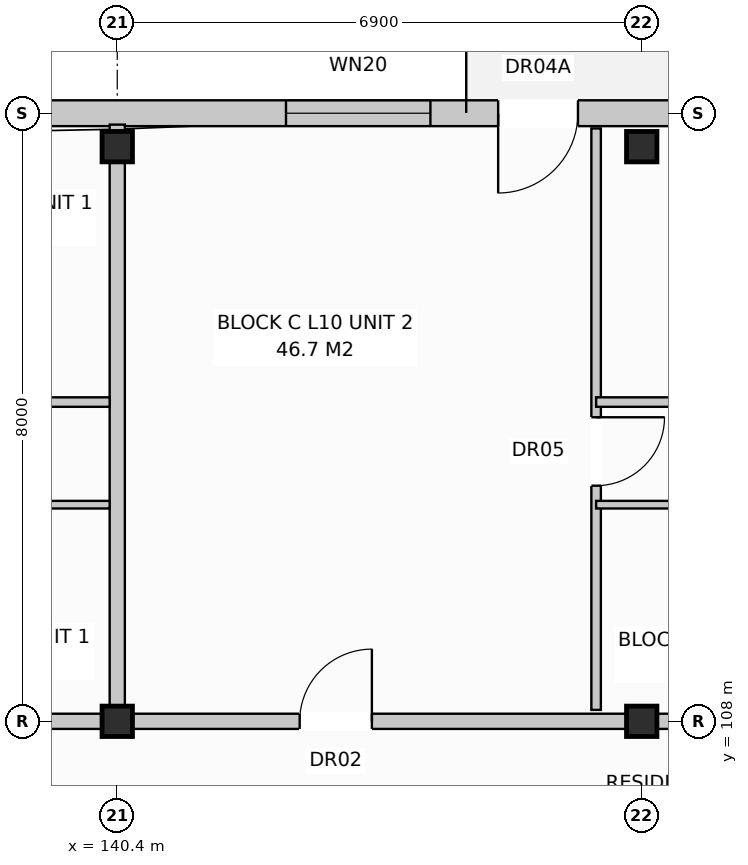
"""IFC4 building model, lengths in metres.
Left out: names, types, materials, properties, quantities, classifications, styles, units other than length and angle.
Written with IfcOpenShell. Run it as: python <this file> out.ifc"""

import sys

from ifc_helpers import new_model, si_unit, direction, frame, frame_2d, origin, origin_with_axes, origin_2d, place, context, subcontext, project, spatial, rectangle, extrude, element, fill, save


model = new_model("IFC4")
c1 = context("Model", 3, precision=1e-05, world=origin(), true_north=direction((0.0, 1.0)))
c2 = subcontext(c1, "Body", "Model", "MODEL_VIEW")
j1 = project(units=[si_unit("LENGTHUNIT", "METRE"), si_unit("PLANEANGLEUNIT", "RADIAN")], contexts=[c1])
p1 = place(None, origin())
s1 = spatial("IfcSite", under=j1, at=p1, CompositionType="ELEMENT")
p2 = place(p1, origin())
s2 = spatial("IfcBuilding", under=s1, at=p2, CompositionType="ELEMENT")
p3 = place(p2, frame((0.0, 0.0, 33.6)))
s3 = spatial("IfcBuildingStorey", under=s2, at=p3, CompositionType="ELEMENT", Elevation=33.6)
for number, where, z_axis, x_axis in (
    (1, (140.4, 108.0, 0.0), (0.0, 0.0, 1.0), (1.0, 0.0, 0.0)),
    (2, (140.4, 115.56, 0.0), (0.0, 0.0, 1.0), (1.0, 0.0, 0.0)),
    (3, (147.3, 108.0, 0.0), (0.0, 0.0, 1.0), (1.0, 0.0, 0.0)),
    (4, (147.3, 115.56, 0.0), (0.0, 0.0, 1.0), (1.0, 0.0, 0.0)),
):
    element("IfcColumn", number, at=place(p3, frame(where, z_axis=z_axis, x_axis=x_axis)), inside=s3, PredefinedType="COLUMN", context=c2, shape_type="SweptSolid", body=[
        extrude(rectangle(XDim=0.4, YDim=0.4, at=origin_2d()), origin(), (0.0, 0.0, 1.0), 3.2),
    ])
p4 = place(p3, frame((126.76, 116.0, 0.0), z_axis=(0.0, 0.0, 1.0), x_axis=(1.0, 0.0, 0.0)))
e5 = element("IfcWall", 5, at=p4, inside=s3, PredefinedType="STANDARD", context=c2, shape_type="SweptSolid", body=[
    extrude(rectangle(XDim=41.08, YDim=0.34, at=frame_2d((20.54, 0.0))), origin(), (0.0, 0.0, 1.0), 2.91),
])
p5 = place(p4, frame((7.36, 0.0, 0.0)))
e6 = element("IfcOpeningElement", 6, at=p5, cuts=e5, PredefinedType="OPENING", context=c2, shape_type="SweptSolid", body=[
    extrude(rectangle(XDim=1.05, YDim=2.12, at=frame_2d((0.525, 1.06))), frame((0.0, 0.182, 0.0), z_axis=(0.0, -1.0, 0.0), x_axis=(1.0, 0.0, 0.0)), (0.0, 0.0, 1.0), 0.364),
])
p6 = place(p4, frame((18.651, 0.0, 0.0)))
e7 = element("IfcOpeningElement", 7, at=p6, cuts=e5, PredefinedType="OPENING", context=c2, shape_type="SweptSolid", body=[
    extrude(rectangle(XDim=1.05, YDim=2.12, at=frame_2d((0.525, 1.06))), frame((0.0, 0.182, 0.0), z_axis=(0.0, -1.0, 0.0), x_axis=(1.0, 0.0, 0.0)), (0.0, 0.0, 1.0), 0.364),
])
p7 = place(p4, frame((32.651, 0.0, 0.0)))
e8 = element("IfcOpeningElement", 8, at=p7, cuts=e5, PredefinedType="OPENING", context=c2, shape_type="SweptSolid", body=[
    extrude(rectangle(XDim=1.05, YDim=2.12, at=frame_2d((0.525, 1.06))), frame((0.0, 0.182, 0.0), z_axis=(0.0, -1.0, 0.0), x_axis=(1.0, 0.0, 0.0)), (0.0, 0.0, 1.0), 0.364),
])
p8 = place(p4, frame((1.535, 0.0, 0.8)))
e9 = element("IfcOpeningElement", 9, at=p8, cuts=e5, PredefinedType="OPENING", context=c2, shape_type="SweptSolid", body=[
    extrude(rectangle(XDim=1.95, YDim=1.65, at=frame_2d((0.975, 0.825))), frame((0.0, 0.182, 0.0), z_axis=(0.0, -1.0, 0.0), x_axis=(1.0, 0.0, 0.0)), (0.0, 0.0, 1.0), 0.364),
])
p9 = place(p4, frame((10.51, 0.0, 0.8)))
e10 = element("IfcOpeningElement", 10, at=p9, cuts=e5, PredefinedType="OPENING", context=c2, shape_type="SweptSolid", body=[
    extrude(rectangle(XDim=1.8, YDim=1.7, at=frame_2d((0.9, 0.85))), frame((0.0, 0.182, 0.0), z_axis=(0.0, -1.0, 0.0), x_axis=(1.0, 0.0, 0.0)), (0.0, 0.0, 1.0), 0.364),
])
p10 = place(p4, frame((15.86, 0.0, 0.8)))
e11 = element("IfcOpeningElement", 11, at=p10, cuts=e5, PredefinedType="OPENING", context=c2, shape_type="SweptSolid", body=[
    extrude(rectangle(XDim=1.9, YDim=1.85, at=frame_2d((0.95, 0.925))), frame((0.0, 0.182, 0.0), z_axis=(0.0, -1.0, 0.0), x_axis=(1.0, 0.0, 0.0)), (0.0, 0.0, 1.0), 0.364),
])
p11 = place(p4, frame((21.96, 0.0, 0.72)))
e12 = element("IfcOpeningElement", 12, at=p11, cuts=e5, PredefinedType="OPENING", context=c2, shape_type="SweptSolid", body=[
    extrude(rectangle(XDim=1.1, YDim=1.5, at=frame_2d((0.55, 0.75))), frame((0.0, 0.182, 0.0), z_axis=(0.0, -1.0, 0.0), x_axis=(1.0, 0.0, 0.0)), (0.0, 0.0, 1.0), 0.364),
])
p12 = place(p4, frame((28.01, 0.0, 0.8)))
e13 = element("IfcOpeningElement", 13, at=p12, cuts=e5, PredefinedType="OPENING", context=c2, shape_type="SweptSolid", body=[
    extrude(rectangle(XDim=1.8, YDim=1.7, at=frame_2d((0.9, 0.85))), frame((0.0, 0.182, 0.0), z_axis=(0.0, -1.0, 0.0), x_axis=(1.0, 0.0, 0.0)), (0.0, 0.0, 1.0), 0.364),
])
p13 = place(p4, frame((30.81, 0.0, 0.85)))
e14 = element("IfcOpeningElement", 14, at=p13, cuts=e5, PredefinedType="OPENING", context=c2, shape_type="SweptSolid", body=[
    extrude(rectangle(XDim=1.5, YDim=1.65, at=frame_2d((0.75, 0.825))), frame((0.0, 0.182, 0.0), z_axis=(0.0, -1.0, 0.0), x_axis=(1.0, 0.0, 0.0)), (0.0, 0.0, 1.0), 0.364),
])
p14 = place(p4, frame((35.76, 0.0, 0.72)))
e15 = element("IfcOpeningElement", 15, at=p14, cuts=e5, PredefinedType="OPENING", context=c2, shape_type="SweptSolid", body=[
    extrude(rectangle(XDim=1.1, YDim=1.5, at=frame_2d((0.55, 0.75))), frame((0.0, 0.182, 0.0), z_axis=(0.0, -1.0, 0.0), x_axis=(1.0, 0.0, 0.0)), (0.0, 0.0, 1.0), 0.364),
])
p15 = place(p4, frame((38.675, 0.0, 0.8)))
e16 = element("IfcOpeningElement", 16, at=p15, cuts=e5, PredefinedType="OPENING", context=c2, shape_type="SweptSolid", body=[
    extrude(rectangle(XDim=1.8, YDim=1.7, at=frame_2d((0.9, 0.85))), frame((0.0, 0.182, 0.0), z_axis=(0.0, -1.0, 0.0), x_axis=(1.0, 0.0, 0.0)), (0.0, 0.0, 1.0), 0.364),
])
p16 = place(p3, frame((140.4, 108.15, 0.0), z_axis=(0.0, 0.0, 1.0), x_axis=(0.0, 1.0, 0.0)))
e17 = element("IfcWall", 17, at=p16, inside=s3, PredefinedType="PARTITIONING", context=c2, shape_type="SweptSolid", body=[
    extrude(rectangle(XDim=7.7, YDim=0.2, at=frame_2d((3.85, 0.0))), origin(), (0.0, 0.0, 1.0), 2.96),
])
p17 = place(p3, frame((126.6, 108.0, 0.0), z_axis=(0.0, 0.0, 1.0), x_axis=(1.0, 0.0, 0.0)))
e18 = element("IfcWall", 18, at=p17, inside=s3, PredefinedType="PARTITIONING", context=c2, shape_type="SweptSolid", body=[
    extrude(rectangle(XDim=13.8, YDim=0.2, at=frame_2d((6.9, 0.0))), origin(), (0.0, 0.0, 1.0), 2.35),
])
p18 = place(p17, frame((2.4, 0.0, 0.0)))
e19 = element("IfcOpeningElement", 19, at=p18, cuts=e18, PredefinedType="OPENING", context=c2, shape_type="SweptSolid", body=[
    extrude(rectangle(XDim=0.95, YDim=2.15, at=frame_2d((0.475, 1.075))), frame((0.0, 0.112, 0.0), z_axis=(0.0, -1.0, 0.0), x_axis=(1.0, 0.0, 0.0)), (0.0, 0.0, 1.0), 0.224),
])
p19 = place(p3, frame((131.8, 110.85, 0.0), z_axis=(0.0, 0.0, 1.0), x_axis=(1.0, 0.0, 0.0)))
e20 = element("IfcWall", 20, at=p19, inside=s3, PredefinedType="PARTITIONING", context=c2, shape_type="SweptSolid", body=[
    extrude(rectangle(XDim=8.5, YDim=0.1, at=frame_2d((4.25, 0.0))), origin(), (0.0, 0.0, 1.0), 2.96),
])
p20 = place(p19, frame((1.0, 0.0, 0.0)))
e21 = element("IfcOpeningElement", 21, at=p20, cuts=e20, PredefinedType="OPENING", context=c2, shape_type="SweptSolid", body=[
    extrude(rectangle(XDim=0.85, YDim=2.1, at=frame_2d((0.425, 1.05))), frame((0.0, 0.062, 0.0), z_axis=(0.0, -1.0, 0.0), x_axis=(1.0, 0.0, 0.0)), (0.0, 0.0, 1.0), 0.124),
])
p21 = place(p19, frame((3.4, 0.0, 0.0)))
e22 = element("IfcOpeningElement", 22, at=p21, cuts=e20, PredefinedType="OPENING", context=c2, shape_type="SweptSolid", body=[
    extrude(rectangle(XDim=0.85, YDim=2.05, at=frame_2d((0.425, 1.025))), frame((0.0, 0.062, 0.0), z_axis=(0.0, -1.0, 0.0), x_axis=(1.0, 0.0, 0.0)), (0.0, 0.0, 1.0), 0.124),
])
p22 = place(p19, frame((6.2, 0.0, 0.0)))
e23 = element("IfcOpeningElement", 23, at=p22, cuts=e20, PredefinedType="OPENING", context=c2, shape_type="SweptSolid", body=[
    extrude(rectangle(XDim=0.85, YDim=2.05, at=frame_2d((0.425, 1.025))), frame((0.0, 0.062, 0.0), z_axis=(0.0, -1.0, 0.0), x_axis=(1.0, 0.0, 0.0)), (0.0, 0.0, 1.0), 0.124),
])
p23 = place(p3, frame((131.8, 112.2, 0.0), z_axis=(0.0, 0.0, 1.0), x_axis=(1.0, 0.0, 0.0)))
e24 = element("IfcWall", 24, at=p23, inside=s3, PredefinedType="PARTITIONING", context=c2, shape_type="SweptSolid", body=[
    extrude(rectangle(XDim=8.5, YDim=0.125, at=frame_2d((4.25, 0.0))), origin(), (0.0, 0.0, 1.0), 2.96),
])
p24 = place(p23, frame((1.5, 0.0, 0.0)))
e25 = element("IfcOpeningElement", 25, at=p24, cuts=e24, PredefinedType="OPENING", context=c2, shape_type="SweptSolid", body=[
    extrude(rectangle(XDim=0.9, YDim=2.1, at=frame_2d((0.45, 1.05))), frame((0.0, 0.074, 0.0), z_axis=(0.0, -1.0, 0.0), x_axis=(1.0, 0.0, 0.0)), (0.0, 0.0, 1.0), 0.149),
])
p25 = place(p23, frame((5.6, 0.0, 0.0)))
e26 = element("IfcOpeningElement", 26, at=p25, cuts=e24, PredefinedType="OPENING", context=c2, shape_type="SweptSolid", body=[
    extrude(rectangle(XDim=0.9, YDim=2.1, at=frame_2d((0.45, 1.05))), frame((0.0, 0.074, 0.0), z_axis=(0.0, -1.0, 0.0), x_axis=(1.0, 0.0, 0.0)), (0.0, 0.0, 1.0), 0.149),
])
p26 = place(p3, frame((140.4, 108.0, 0.0), z_axis=(0.0, 0.0, 1.0), x_axis=(1.0, 0.0, 0.0)))
e27 = element("IfcWall", 27, at=p26, inside=s3, PredefinedType="PARTITIONING", context=c2, shape_type="SweptSolid", body=[
    extrude(rectangle(XDim=20.7, YDim=0.2, at=frame_2d((10.35, 0.0))), origin(), (0.0, 0.0, 1.0), 2.35),
])
p27 = place(p26, frame((2.4, 0.0, 0.0)))
e28 = element("IfcOpeningElement", 28, at=p27, cuts=e27, PredefinedType="OPENING", context=c2, shape_type="SweptSolid", body=[
    extrude(rectangle(XDim=0.95, YDim=2.15, at=frame_2d((0.475, 1.075))), frame((0.0, 0.112, 0.0), z_axis=(0.0, -1.0, 0.0), x_axis=(1.0, 0.0, 0.0)), (0.0, 0.0, 1.0), 0.224),
])
p28 = place(p3, frame((146.7, 108.15, 0.0), z_axis=(0.0, 0.0, 1.0), x_axis=(0.0, 1.0, 0.0)))
e29 = element("IfcWall", 29, at=p28, inside=s3, PredefinedType="PARTITIONING", context=c2, shape_type="SweptSolid", body=[
    extrude(rectangle(XDim=7.65, YDim=0.125, at=frame_2d((3.825, 0.0))), origin(), (0.0, 0.0, 1.0), 2.96),
])
p29 = place(p28, frame((2.95, 0.0, 0.0)))
e30 = element("IfcOpeningElement", 30, at=p29, cuts=e29, PredefinedType="OPENING", context=c2, shape_type="SweptSolid", body=[
    extrude(rectangle(XDim=0.9, YDim=2.1, at=frame_2d((0.45, 1.05))), frame((0.0, 0.074, 0.0), z_axis=(0.0, -1.0, 0.0), x_axis=(1.0, 0.0, 0.0)), (0.0, 0.0, 1.0), 0.149),
])
p30 = place(p3, frame((146.7, 110.85, 0.0), z_axis=(0.0, 0.0, 1.0), x_axis=(1.0, 0.0, 0.0)))
e31 = element("IfcWall", 31, at=p30, inside=s3, PredefinedType="PARTITIONING", context=c2, shape_type="SweptSolid", body=[
    extrude(rectangle(XDim=14.3, YDim=0.1, at=frame_2d((7.15, 0.0))), origin(), (0.0, 0.0, 1.0), 2.96),
])
p31 = place(p30, frame((1.6, 0.0, 0.0)))
e32 = element("IfcOpeningElement", 32, at=p31, cuts=e31, PredefinedType="OPENING", context=c2, shape_type="SweptSolid", body=[
    extrude(rectangle(XDim=0.9, YDim=2.1, at=frame_2d((0.45, 1.05))), frame((0.0, 0.062, 0.0), z_axis=(0.0, -1.0, 0.0), x_axis=(1.0, 0.0, 0.0)), (0.0, 0.0, 1.0), 0.124),
])
p32 = place(p30, frame((5.1, 0.0, 0.0)))
e33 = element("IfcOpeningElement", 33, at=p32, cuts=e31, PredefinedType="OPENING", context=c2, shape_type="SweptSolid", body=[
    extrude(rectangle(XDim=0.85, YDim=2.05, at=frame_2d((0.425, 1.025))), frame((0.0, 0.062, 0.0), z_axis=(0.0, -1.0, 0.0), x_axis=(1.0, 0.0, 0.0)), (0.0, 0.0, 1.0), 0.124),
])
p33 = place(p30, frame((8.2, 0.0, 0.0)))
e34 = element("IfcOpeningElement", 34, at=p33, cuts=e31, PredefinedType="OPENING", context=c2, shape_type="SweptSolid", body=[
    extrude(rectangle(XDim=0.85, YDim=2.05, at=frame_2d((0.425, 1.025))), frame((0.0, 0.062, 0.0), z_axis=(0.0, -1.0, 0.0), x_axis=(1.0, 0.0, 0.0)), (0.0, 0.0, 1.0), 0.124),
])
p34 = place(p30, frame((11.6, 0.0, 0.0)))
e35 = element("IfcOpeningElement", 35, at=p34, cuts=e31, PredefinedType="OPENING", context=c2, shape_type="SweptSolid", body=[
    extrude(rectangle(XDim=0.85, YDim=2.05, at=frame_2d((0.425, 1.025))), frame((0.0, 0.062, 0.0), z_axis=(0.0, -1.0, 0.0), x_axis=(1.0, 0.0, 0.0)), (0.0, 0.0, 1.0), 0.124),
])
p35 = place(p3, frame((146.7, 112.2, 0.0), z_axis=(0.0, 0.0, 1.0), x_axis=(1.0, 0.0, 0.0)))
e36 = element("IfcWall", 36, at=p35, inside=s3, PredefinedType="PARTITIONING", context=c2, shape_type="SweptSolid", body=[
    extrude(rectangle(XDim=10.4, YDim=0.125, at=frame_2d((5.2, 0.0))), origin(), (0.0, 0.0, 1.0), 2.96),
])
p36 = place(p35, frame((2.0, 0.0, 0.0)))
e37 = element("IfcOpeningElement", 37, at=p36, cuts=e36, PredefinedType="OPENING", context=c2, shape_type="SweptSolid", body=[
    extrude(rectangle(XDim=0.9, YDim=2.1, at=frame_2d((0.45, 1.05))), frame((0.0, 0.074, 0.0), z_axis=(0.0, -1.0, 0.0), x_axis=(1.0, 0.0, 0.0)), (0.0, 0.0, 1.0), 0.149),
])
p37 = place(p35, frame((7.2, 0.0, 0.0)))
e38 = element("IfcOpeningElement", 38, at=p37, cuts=e36, PredefinedType="OPENING", context=c2, shape_type="SweptSolid", body=[
    extrude(rectangle(XDim=0.9, YDim=2.1, at=frame_2d((0.45, 1.05))), frame((0.0, 0.074, 0.0), z_axis=(0.0, -1.0, 0.0), x_axis=(1.0, 0.0, 0.0)), (0.0, 0.0, 1.0), 0.149),
])
p38 = place(p6, frame((1.05, 0.0, 0.0), z_axis=(0.0, 0.0, 1.0), x_axis=(-1.0, 0.0, 0.0)))
e39 = element("IfcDoor", 39, at=p38, inside=s3, OperationType="SINGLE_SWING_LEFT", PredefinedType="DOOR", context=c2, shape_type="SweptSolid", body=[
    extrude(rectangle(XDim=1.05, YDim=2.12, at=frame_2d((0.525, 1.06))), frame((0.0, 0.025, 0.0), z_axis=(0.0, -1.0, 0.0), x_axis=(1.0, 0.0, 0.0)), (0.0, 0.0, 1.0), 0.05),
])
fill(e7, e39)
p39 = place(p10, origin_with_axes())
e40 = element("IfcWindow", 40, at=p39, inside=s3, PartitioningType="SINGLE_PANEL", PredefinedType="WINDOW", context=c2, shape_type="SweptSolid", body=[
    extrude(rectangle(XDim=1.9, YDim=1.85, at=frame_2d((0.95, 0.925))), frame((0.0, 0.03, 0.0), z_axis=(0.0, -1.0, 0.0), x_axis=(1.0, 0.0, 0.0)), (0.0, 0.0, 1.0), 0.06),
])
fill(e11, e40)
p40 = place(p27, origin_with_axes())
e41 = element("IfcDoor", 41, at=p40, inside=s3, OperationType="SINGLE_SWING_RIGHT", PredefinedType="DOOR", context=c2, shape_type="SweptSolid", body=[
    extrude(rectangle(XDim=0.95, YDim=2.15, at=frame_2d((0.475, 1.075))), frame((0.0, 0.025, 0.0), z_axis=(0.0, -1.0, 0.0), x_axis=(1.0, 0.0, 0.0)), (0.0, 0.0, 1.0), 0.05),
])
fill(e28, e41)
p41 = place(p29, frame((0.9, 0.0, 0.0), z_axis=(0.0, 0.0, 1.0), x_axis=(-1.0, 0.0, 0.0)))
e42 = element("IfcDoor", 42, at=p41, inside=s3, OperationType="SINGLE_SWING_RIGHT", PredefinedType="DOOR", context=c2, shape_type="SweptSolid", body=[
    extrude(rectangle(XDim=0.9, YDim=2.1, at=frame_2d((0.45, 1.05))), frame((0.0, 0.025, 0.0), z_axis=(0.0, -1.0, 0.0), x_axis=(1.0, 0.0, 0.0)), (0.0, 0.0, 1.0), 0.05),
])
fill(e30, e42)
save(model, sys.argv[1])
